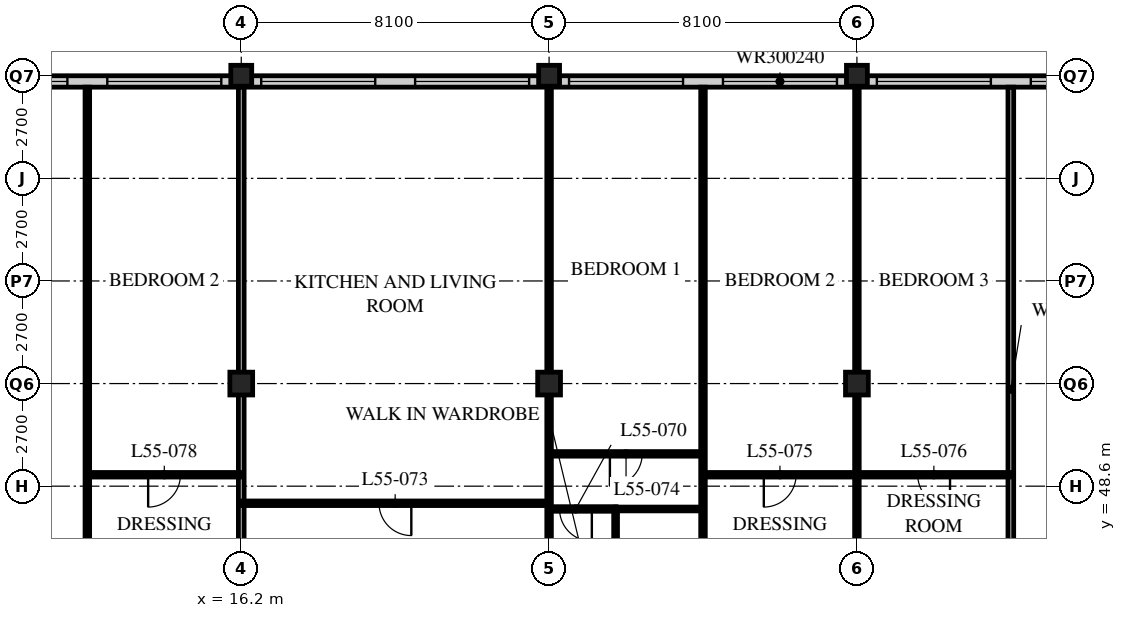
"""IFC4 building model, lengths in metres.
Left out: names, types, materials, properties, quantities, classifications, styles, units other than length and angle.
Written with IfcOpenShell. Run it as: python <this file> out.ifc"""

import sys

from ifc_helpers import new_model, si_unit, direction, frame, frame_2d, origin, origin_2d, place, context, subcontext, project, spatial, rectangle, hollow_rectangle, extrude, element, fill, save


model = new_model("IFC4")
c1 = context("Model", 3, precision=1e-05, world=origin(), true_north=direction((0.0, 1.0)))
c2 = subcontext(c1, "Body", "Model", "MODEL_VIEW")
j1 = project(units=[si_unit("LENGTHUNIT", "METRE"), si_unit("PLANEANGLEUNIT", "RADIAN")], contexts=[c1])
p1 = place(None, origin())
s1 = spatial("IfcSite", under=j1, at=p1, CompositionType="ELEMENT")
p2 = place(p1, origin())
s2 = spatial("IfcBuilding", under=s1, at=p2, CompositionType="ELEMENT")
p3 = place(p2, frame((0.0, 0.0, 213.6)))
s3 = spatial("IfcBuildingStorey", under=s2, at=p3, CompositionType="ELEMENT", Elevation=213.6)
p4 = place(p3, frame((16.2, 51.3, 0.0), z_axis=(0.0, 0.0, 1.0), x_axis=(1.0, 0.0, 0.0)))
e1 = element("IfcColumn", 1, at=p4, inside=s3, PredefinedType="COLUMN", context=c2, shape_type="SweptSolid", body=[
    extrude(hollow_rectangle(XDim=0.6, YDim=0.6, WallThickness=0.05, at=origin_2d()), origin(), (0.0, 0.0, 1.0), 3.6),
])
p5 = place(p3, frame((16.2, 59.4, 0.0), z_axis=(0.0, 0.0, 1.0), x_axis=(1.0, 0.0, 0.0)))
e2 = element("IfcColumn", 2, at=p5, inside=s3, PredefinedType="COLUMN", context=c2, shape_type="SweptSolid", body=[
    extrude(hollow_rectangle(XDim=0.55, YDim=0.55, WallThickness=0.045, at=origin_2d()), origin(), (0.0, 0.0, 1.0), 3.6),
])
p6 = place(p3, frame((24.3, 51.3, 0.0), z_axis=(0.0, 0.0, 1.0), x_axis=(1.0, 0.0, 0.0)))
e3 = element("IfcColumn", 3, at=p6, inside=s3, PredefinedType="COLUMN", context=c2, shape_type="SweptSolid", body=[
    extrude(hollow_rectangle(XDim=0.6, YDim=0.6, WallThickness=0.05, at=origin_2d()), origin(), (0.0, 0.0, 1.0), 3.6),
])
p7 = place(p3, frame((24.3, 59.4, 0.0), z_axis=(0.0, 0.0, 1.0), x_axis=(1.0, 0.0, 0.0)))
e4 = element("IfcColumn", 4, at=p7, inside=s3, PredefinedType="COLUMN", context=c2, shape_type="SweptSolid", body=[
    extrude(hollow_rectangle(XDim=0.55, YDim=0.55, WallThickness=0.045, at=origin_2d()), origin(), (0.0, 0.0, 1.0), 3.6),
])
p8 = place(p3, frame((32.4, 51.3, 0.0), z_axis=(0.0, 0.0, 1.0), x_axis=(1.0, 0.0, 0.0)))
e5 = element("IfcColumn", 5, at=p8, inside=s3, PredefinedType="COLUMN", context=c2, shape_type="SweptSolid", body=[
    extrude(hollow_rectangle(XDim=0.6, YDim=0.6, WallThickness=0.05, at=origin_2d()), origin(), (0.0, 0.0, 1.0), 3.6),
])
p9 = place(p3, frame((32.4, 59.4, 0.0), z_axis=(0.0, 0.0, 1.0), x_axis=(1.0, 0.0, 0.0)))
e6 = element("IfcColumn", 6, at=p9, inside=s3, PredefinedType="COLUMN", context=c2, shape_type="SweptSolid", body=[
    extrude(hollow_rectangle(XDim=0.55, YDim=0.55, WallThickness=0.045, at=origin_2d()), origin(), (0.0, 0.0, 1.0), 3.6),
])
p10 = place(p3, frame((48.3, 59.25, 0.0), z_axis=(0.0, 0.0, 1.0), x_axis=(-1.0, 0.0, 0.0)))
e7 = element("IfcWall", 7, at=p10, inside=s3, PredefinedType="SOLIDWALL", context=c2, shape_type="SweptSolid", body=[
    extrude(rectangle(XDim=40.2, YDim=0.3, at=frame_2d((20.1, 0.0))), origin(), (0.0, 0.0, 1.0), 3.39),
])
p11 = place(p10, frame((0.225, 0.0, 0.6)))
e8 = element("IfcOpeningElement", 8, at=p11, cuts=e7, PredefinedType="OPENING", context=c2, shape_type="SweptSolid", body=[
    extrude(rectangle(XDim=3.0, YDim=2.4, at=frame_2d((1.5, 1.2))), frame((0.0, 0.16, 0.0), z_axis=(0.0, -1.0, 0.0), x_axis=(1.0, 0.0, 0.0)), (0.0, 0.0, 1.0), 0.32),
])
p12 = place(p10, frame((4.275, 0.0, 0.6)))
e9 = element("IfcOpeningElement", 9, at=p12, cuts=e7, PredefinedType="OPENING", context=c2, shape_type="SweptSolid", body=[
    extrude(rectangle(XDim=3.0, YDim=2.4, at=frame_2d((1.5, 1.2))), frame((0.0, 0.16, 0.0), z_axis=(0.0, -1.0, 0.0), x_axis=(1.0, 0.0, 0.0)), (0.0, 0.0, 1.0), 0.32),
])
p13 = place(p10, frame((8.325, 0.0, 0.6)))
e10 = element("IfcOpeningElement", 10, at=p13, cuts=e7, PredefinedType="OPENING", context=c2, shape_type="SweptSolid", body=[
    extrude(rectangle(XDim=3.0, YDim=2.4, at=frame_2d((1.5, 1.2))), frame((0.0, 0.16, 0.0), z_axis=(0.0, -1.0, 0.0), x_axis=(1.0, 0.0, 0.0)), (0.0, 0.0, 1.0), 0.32),
])
p14 = place(p10, frame((12.375, 0.0, 0.6)))
e11 = element("IfcOpeningElement", 11, at=p14, cuts=e7, PredefinedType="OPENING", context=c2, shape_type="SweptSolid", body=[
    extrude(rectangle(XDim=3.0, YDim=2.4, at=frame_2d((1.5, 1.2))), frame((0.0, 0.16, 0.0), z_axis=(0.0, -1.0, 0.0), x_axis=(1.0, 0.0, 0.0)), (0.0, 0.0, 1.0), 0.32),
])
p15 = place(p10, frame((16.425, 0.0, 0.6)))
e12 = element("IfcOpeningElement", 12, at=p15, cuts=e7, PredefinedType="OPENING", context=c2, shape_type="SweptSolid", body=[
    extrude(rectangle(XDim=3.0, YDim=2.4, at=frame_2d((1.5, 1.2))), frame((0.0, 0.16, 0.0), z_axis=(0.0, -1.0, 0.0), x_axis=(1.0, 0.0, 0.0)), (0.0, 0.0, 1.0), 0.32),
])
p16 = place(p10, frame((20.475, 0.0, 0.6)))
e13 = element("IfcOpeningElement", 13, at=p16, cuts=e7, PredefinedType="OPENING", context=c2, shape_type="SweptSolid", body=[
    extrude(rectangle(XDim=3.0, YDim=2.4, at=frame_2d((1.5, 1.2))), frame((0.0, 0.16, 0.0), z_axis=(0.0, -1.0, 0.0), x_axis=(1.0, 0.0, 0.0)), (0.0, 0.0, 1.0), 0.32),
])
p17 = place(p10, frame((24.525, 0.0, 0.6)))
e14 = element("IfcOpeningElement", 14, at=p17, cuts=e7, PredefinedType="OPENING", context=c2, shape_type="SweptSolid", body=[
    extrude(rectangle(XDim=3.0, YDim=2.4, at=frame_2d((1.5, 1.2))), frame((0.0, 0.16, 0.0), z_axis=(0.0, -1.0, 0.0), x_axis=(1.0, 0.0, 0.0)), (0.0, 0.0, 1.0), 0.32),
])
p18 = place(p10, frame((28.575, 0.0, 0.6)))
e15 = element("IfcOpeningElement", 15, at=p18, cuts=e7, PredefinedType="OPENING", context=c2, shape_type="SweptSolid", body=[
    extrude(rectangle(XDim=3.0, YDim=2.4, at=frame_2d((1.5, 1.2))), frame((0.0, 0.16, 0.0), z_axis=(0.0, -1.0, 0.0), x_axis=(1.0, 0.0, 0.0)), (0.0, 0.0, 1.0), 0.32),
])
p19 = place(p10, frame((32.625, 0.0, 0.6)))
e16 = element("IfcOpeningElement", 16, at=p19, cuts=e7, PredefinedType="OPENING", context=c2, shape_type="SweptSolid", body=[
    extrude(rectangle(XDim=3.0, YDim=2.4, at=frame_2d((1.5, 1.2))), frame((0.0, 0.16, 0.0), z_axis=(0.0, -1.0, 0.0), x_axis=(1.0, 0.0, 0.0)), (0.0, 0.0, 1.0), 0.32),
])
p20 = place(p10, frame((36.675, 0.0, 0.6)))
e17 = element("IfcOpeningElement", 17, at=p20, cuts=e7, PredefinedType="OPENING", context=c2, shape_type="SweptSolid", body=[
    extrude(rectangle(XDim=3.0, YDim=2.4, at=frame_2d((1.5, 1.2))), frame((0.0, 0.16, 0.0), z_axis=(0.0, -1.0, 0.0), x_axis=(1.0, 0.0, 0.0)), (0.0, 0.0, 1.0), 0.32),
])
p21 = place(p3, frame((26.05, 45.6, 0.0), z_axis=(0.0, 0.0, 1.0), x_axis=(0.0, 1.0, 0.0)))
e18 = element("IfcWall", 18, at=p21, inside=s3, PredefinedType="PARTITIONING", context=c2, shape_type="SweptSolid", body=[
    extrude(rectangle(XDim=2.4, YDim=0.1, at=frame_2d((1.2, 0.0))), origin(), (0.0, 0.0, 1.0), 3.39),
])
p22 = place(p21, frame((0.8, 0.0, 0.0)))
e19 = element("IfcOpeningElement", 19, at=p22, cuts=e18, PredefinedType="OPENING", context=c2, shape_type="SweptSolid", body=[
    extrude(rectangle(XDim=0.8, YDim=2.1, at=frame_2d((0.4, 1.05))), frame((0.0, 0.06, 0.0), z_axis=(0.0, -1.0, 0.0), x_axis=(1.0, 0.0, 0.0)), (0.0, 0.0, 1.0), 0.12),
])
p23 = place(p3, frame((26.05, 48.0, 0.0), z_axis=(0.0, 0.0, 1.0), x_axis=(1.0, 0.0, 0.0)))
e20 = element("IfcWall", 20, at=p23, inside=s3, PredefinedType="PARTITIONING", context=c2, shape_type="SweptSolid", body=[
    extrude(rectangle(XDim=2.3, YDim=0.1, at=frame_2d((1.15, 0.0))), origin(), (0.0, 0.0, 1.0), 3.39),
])
p24 = place(p3, frame((24.3, 45.6, 0.0), z_axis=(0.0, 0.0, 1.0), x_axis=(0.0, 1.0, 0.0)))
e21 = element("IfcWall", 21, at=p24, inside=s3, PredefinedType="PARTITIONING", context=c2, shape_type="SweptSolid", body=[
    extrude(rectangle(XDim=13.5, YDim=0.12, at=frame_2d((6.75, 0.0))), origin(), (0.0, 0.0, 1.0), 2.778),
])
p25 = place(p3, frame((28.35, 45.6, 0.0), z_axis=(0.0, 0.0, 1.0), x_axis=(0.0, 1.0, 0.0)))
e22 = element("IfcWall", 22, at=p25, inside=s3, PredefinedType="PARTITIONING", context=c2, shape_type="SweptSolid", body=[
    extrude(rectangle(XDim=13.5, YDim=0.12, at=frame_2d((6.75, 0.0))), origin(), (0.0, 0.0, 1.0), 3.39),
])
p26 = place(p3, frame((32.4, 45.6, 0.0), z_axis=(0.0, 0.0, 1.0), x_axis=(0.0, 1.0, 0.0)))
e23 = element("IfcWall", 23, at=p26, inside=s3, PredefinedType="PARTITIONING", context=c2, shape_type="SweptSolid", body=[
    extrude(rectangle(XDim=13.5, YDim=0.12, at=frame_2d((6.75, 0.0))), origin(), (0.0, 0.0, 1.0), 2.778),
])
p27 = place(p3, frame((36.45, 43.2, 0.0), z_axis=(0.0, 0.0, 1.0), x_axis=(0.0, 1.0, 0.0)))
e24 = element("IfcWall", 24, at=p27, inside=s3, PredefinedType="PARTITIONING", context=c2, shape_type="SweptSolid", body=[
    extrude(rectangle(XDim=15.9, YDim=0.15, at=frame_2d((7.95, 0.0))), origin(), (0.0, 0.0, 1.0), 3.39),
])
p28 = place(p3, frame((12.15, 45.6, 0.0), z_axis=(0.0, 0.0, 1.0), x_axis=(0.0, 1.0, 0.0)))
e25 = element("IfcWall", 25, at=p28, inside=s3, PredefinedType="PARTITIONING", context=c2, shape_type="SweptSolid", body=[
    extrude(rectangle(XDim=13.5, YDim=0.12, at=frame_2d((6.75, 0.0))), origin(), (0.0, 0.0, 1.0), 3.39),
])
p29 = place(p3, frame((16.2, 43.2, 0.0), z_axis=(0.0, 0.0, 1.0), x_axis=(0.0, 1.0, 0.0)))
e26 = element("IfcWall", 26, at=p29, inside=s3, PredefinedType="PARTITIONING", context=c2, shape_type="SweptSolid", body=[
    extrude(rectangle(XDim=15.9, YDim=0.15, at=frame_2d((7.95, 0.0))), origin(), (0.0, 0.0, 1.0), 2.778),
])
p30 = place(p3, frame((24.3, 48.0, 0.0), z_axis=(0.0, 0.0, 1.0), x_axis=(1.0, 0.0, 0.0)))
e27 = element("IfcWall", 27, at=p30, inside=s3, PredefinedType="PARTITIONING", context=c2, shape_type="SweptSolid", body=[
    extrude(rectangle(XDim=1.76, YDim=0.12, at=frame_2d((0.88, 0.0))), origin(), (0.0, 0.0, 1.0), 3.39),
])
p31 = place(p30, frame((0.275, 0.0, 0.0)))
e28 = element("IfcOpeningElement", 28, at=p31, cuts=e27, PredefinedType="OPENING", context=c2, shape_type="SweptSolid", body=[
    extrude(rectangle(XDim=0.85, YDim=2.1, at=frame_2d((0.425, 1.05))), frame((0.0, 0.07, 0.0), z_axis=(0.0, -1.0, 0.0), x_axis=(1.0, 0.0, 0.0)), (0.0, 0.0, 1.0), 0.14),
])
p32 = place(p3, frame((16.2, 48.15, 0.0), z_axis=(0.0, 0.0, 1.0), x_axis=(1.0, 0.0, 0.0)))
e29 = element("IfcWall", 29, at=p32, inside=s3, PredefinedType="PARTITIONING", context=c2, shape_type="SweptSolid", body=[
    extrude(rectangle(XDim=8.1, YDim=0.12, at=frame_2d((4.05, 0.0))), origin(), (0.0, 0.0, 1.0), 3.39),
])
p33 = place(p32, frame((3.625, 0.0, 0.0)))
e30 = element("IfcOpeningElement", 30, at=p33, cuts=e29, PredefinedType="OPENING", context=c2, shape_type="SweptSolid", body=[
    extrude(rectangle(XDim=0.85, YDim=2.1, at=frame_2d((0.425, 1.05))), frame((0.0, 0.07, 0.0), z_axis=(0.0, -1.0, 0.0), x_axis=(1.0, 0.0, 0.0)), (0.0, 0.0, 1.0), 0.14),
])
p34 = place(p3, frame((24.3, 49.45, 0.0), z_axis=(0.0, 0.0, 1.0), x_axis=(1.0, 0.0, 0.0)))
e31 = element("IfcWall", 31, at=p34, inside=s3, PredefinedType="PARTITIONING", context=c2, shape_type="SweptSolid", body=[
    extrude(rectangle(XDim=4.05, YDim=0.12, at=frame_2d((2.025, 0.0))), origin(), (0.0, 0.0, 1.0), 3.39),
])
p35 = place(p34, frame((1.6, 0.0, 0.0)))
e32 = element("IfcOpeningElement", 32, at=p35, cuts=e31, PredefinedType="OPENING", context=c2, shape_type="SweptSolid", body=[
    extrude(rectangle(XDim=0.85, YDim=2.1, at=frame_2d((0.425, 1.05))), frame((0.0, 0.07, 0.0), z_axis=(0.0, -1.0, 0.0), x_axis=(1.0, 0.0, 0.0)), (0.0, 0.0, 1.0), 0.14),
])
p36 = place(p3, frame((28.35, 48.9, 0.0), z_axis=(0.0, 0.0, 1.0), x_axis=(1.0, 0.0, 0.0)))
e33 = element("IfcWall", 33, at=p36, inside=s3, PredefinedType="PARTITIONING", context=c2, shape_type="SweptSolid", body=[
    extrude(rectangle(XDim=8.1, YDim=0.12, at=frame_2d((4.05, 0.0))), origin(), (0.0, 0.0, 1.0), 3.39),
])
p37 = place(p36, frame((1.6, 0.0, 0.0)))
e34 = element("IfcOpeningElement", 34, at=p37, cuts=e33, PredefinedType="OPENING", context=c2, shape_type="SweptSolid", body=[
    extrude(rectangle(XDim=0.85, YDim=2.1, at=frame_2d((0.425, 1.05))), frame((0.0, 0.07, 0.0), z_axis=(0.0, -1.0, 0.0), x_axis=(1.0, 0.0, 0.0)), (0.0, 0.0, 1.0), 0.14),
])
p38 = place(p36, frame((5.65, 0.0, 0.0)))
e35 = element("IfcOpeningElement", 35, at=p38, cuts=e33, PredefinedType="OPENING", context=c2, shape_type="SweptSolid", body=[
    extrude(rectangle(XDim=0.85, YDim=2.1, at=frame_2d((0.425, 1.05))), frame((0.0, 0.07, 0.0), z_axis=(0.0, -1.0, 0.0), x_axis=(1.0, 0.0, 0.0)), (0.0, 0.0, 1.0), 0.14),
])
p39 = place(p3, frame((12.15, 48.9, 0.0), z_axis=(0.0, 0.0, 1.0), x_axis=(1.0, 0.0, 0.0)))
e36 = element("IfcWall", 36, at=p39, inside=s3, PredefinedType="PARTITIONING", context=c2, shape_type="SweptSolid", body=[
    extrude(rectangle(XDim=4.05, YDim=0.12, at=frame_2d((2.025, 0.0))), origin(), (0.0, 0.0, 1.0), 3.39),
])
p40 = place(p39, frame((1.6, 0.0, 0.0)))
e37 = element("IfcOpeningElement", 37, at=p40, cuts=e36, PredefinedType="OPENING", context=c2, shape_type="SweptSolid", body=[
    extrude(rectangle(XDim=0.85, YDim=2.1, at=frame_2d((0.425, 1.05))), frame((0.0, 0.07, 0.0), z_axis=(0.0, -1.0, 0.0), x_axis=(1.0, 0.0, 0.0)), (0.0, 0.0, 1.0), 0.14),
])
p41 = place(p13, origin())
e38 = element("IfcWindow", 38, at=p41, inside=s3, PartitioningType="SINGLE_PANEL", PredefinedType="WINDOW", context=c2, shape_type="SweptSolid", body=[
    extrude(rectangle(XDim=3.0, YDim=2.4, at=frame_2d((1.5, 1.2))), frame((0.0, 0.03, 0.0), z_axis=(0.0, -1.0, 0.0), x_axis=(1.0, 0.0, 0.0)), (0.0, 0.0, 1.0), 0.06),
])
fill(e10, e38)
p42 = place(p14, origin())
e39 = element("IfcWindow", 39, at=p42, inside=s3, PartitioningType="SINGLE_PANEL", PredefinedType="WINDOW", context=c2, shape_type="SweptSolid", body=[
    extrude(rectangle(XDim=3.0, YDim=2.4, at=frame_2d((1.5, 1.2))), frame((0.0, 0.03, 0.0), z_axis=(0.0, -1.0, 0.0), x_axis=(1.0, 0.0, 0.0)), (0.0, 0.0, 1.0), 0.06),
])
fill(e11, e39)
p43 = place(p15, origin())
e40 = element("IfcWindow", 40, at=p43, inside=s3, PartitioningType="SINGLE_PANEL", PredefinedType="WINDOW", context=c2, shape_type="SweptSolid", body=[
    extrude(rectangle(XDim=3.0, YDim=2.4, at=frame_2d((1.5, 1.2))), frame((0.0, 0.03, 0.0), z_axis=(0.0, -1.0, 0.0), x_axis=(1.0, 0.0, 0.0)), (0.0, 0.0, 1.0), 0.06),
])
fill(e12, e40)
p44 = place(p16, origin())
e41 = element("IfcWindow", 41, at=p44, inside=s3, PartitioningType="SINGLE_PANEL", PredefinedType="WINDOW", context=c2, shape_type="SweptSolid", body=[
    extrude(rectangle(XDim=3.0, YDim=2.4, at=frame_2d((1.5, 1.2))), frame((0.0, 0.03, 0.0), z_axis=(0.0, -1.0, 0.0), x_axis=(1.0, 0.0, 0.0)), (0.0, 0.0, 1.0), 0.06),
])
fill(e13, e41)
p45 = place(p17, origin())
e42 = element("IfcWindow", 42, at=p45, inside=s3, PartitioningType="SINGLE_PANEL", PredefinedType="WINDOW", context=c2, shape_type="SweptSolid", body=[
    extrude(rectangle(XDim=3.0, YDim=2.4, at=frame_2d((1.5, 1.2))), frame((0.0, 0.03, 0.0), z_axis=(0.0, -1.0, 0.0), x_axis=(1.0, 0.0, 0.0)), (0.0, 0.0, 1.0), 0.06),
])
fill(e14, e42)
p46 = place(p18, origin())
e43 = element("IfcWindow", 43, at=p46, inside=s3, PartitioningType="SINGLE_PANEL", PredefinedType="WINDOW", context=c2, shape_type="SweptSolid", body=[
    extrude(rectangle(XDim=3.0, YDim=2.4, at=frame_2d((1.5, 1.2))), frame((0.0, 0.03, 0.0), z_axis=(0.0, -1.0, 0.0), x_axis=(1.0, 0.0, 0.0)), (0.0, 0.0, 1.0), 0.06),
])
fill(e15, e43)
p47 = place(p19, origin())
e44 = element("IfcWindow", 44, at=p47, inside=s3, PartitioningType="SINGLE_PANEL", PredefinedType="WINDOW", context=c2, shape_type="SweptSolid", body=[
    extrude(rectangle(XDim=3.0, YDim=2.4, at=frame_2d((1.5, 1.2))), frame((0.0, 0.03, 0.0), z_axis=(0.0, -1.0, 0.0), x_axis=(1.0, 0.0, 0.0)), (0.0, 0.0, 1.0), 0.06),
])
fill(e16, e44)
p48 = place(p20, origin())
e45 = element("IfcWindow", 45, at=p48, inside=s3, PartitioningType="SINGLE_PANEL", PredefinedType="WINDOW", context=c2, shape_type="SweptSolid", body=[
    extrude(rectangle(XDim=3.0, YDim=2.4, at=frame_2d((1.5, 1.2))), frame((0.0, 0.03, 0.0), z_axis=(0.0, -1.0, 0.0), x_axis=(1.0, 0.0, 0.0)), (0.0, 0.0, 1.0), 0.06),
])
fill(e17, e45)
p49 = place(p31, origin())
e46 = element("IfcDoor", 46, at=p49, inside=s3, OperationType="SINGLE_SWING_LEFT", PredefinedType="DOOR", context=c2, shape_type="SweptSolid", body=[
    extrude(rectangle(XDim=0.85, YDim=2.1, at=frame_2d((0.425, 1.05))), frame((0.0, 0.025, 0.0), z_axis=(0.0, -1.0, 0.0), x_axis=(1.0, 0.0, 0.0)), (0.0, 0.0, 1.0), 0.05),
])
fill(e28, e46)
p50 = place(p33, origin())
e47 = element("IfcDoor", 47, at=p50, inside=s3, OperationType="SINGLE_SWING_LEFT", PredefinedType="DOOR", context=c2, shape_type="SweptSolid", body=[
    extrude(rectangle(XDim=0.85, YDim=2.1, at=frame_2d((0.425, 1.05))), frame((0.0, 0.025, 0.0), z_axis=(0.0, -1.0, 0.0), x_axis=(1.0, 0.0, 0.0)), (0.0, 0.0, 1.0), 0.05),
])
fill(e30, e47)
p51 = place(p35, origin())
e48 = element("IfcDoor", 48, at=p51, inside=s3, OperationType="SINGLE_SWING_RIGHT", PredefinedType="DOOR", context=c2, shape_type="SweptSolid", body=[
    extrude(rectangle(XDim=0.85, YDim=2.1, at=frame_2d((0.425, 1.05))), frame((0.0, 0.025, 0.0), z_axis=(0.0, -1.0, 0.0), x_axis=(1.0, 0.0, 0.0)), (0.0, 0.0, 1.0), 0.05),
])
fill(e32, e48)
p52 = place(p37, origin())
e49 = element("IfcDoor", 49, at=p52, inside=s3, OperationType="SINGLE_SWING_RIGHT", PredefinedType="DOOR", context=c2, shape_type="SweptSolid", body=[
    extrude(rectangle(XDim=0.85, YDim=2.1, at=frame_2d((0.425, 1.05))), frame((0.0, 0.025, 0.0), z_axis=(0.0, -1.0, 0.0), x_axis=(1.0, 0.0, 0.0)), (0.0, 0.0, 1.0), 0.05),
])
fill(e34, e49)
p53 = place(p38, origin())
e50 = element("IfcDoor", 50, at=p53, inside=s3, OperationType="SINGLE_SWING_LEFT", PredefinedType="DOOR", context=c2, shape_type="SweptSolid", body=[
    extrude(rectangle(XDim=0.85, YDim=2.1, at=frame_2d((0.425, 1.05))), frame((0.0, 0.025, 0.0), z_axis=(0.0, -1.0, 0.0), x_axis=(1.0, 0.0, 0.0)), (0.0, 0.0, 1.0), 0.05),
])
fill(e35, e50)
p54 = place(p40, origin())
e51 = element("IfcDoor", 51, at=p54, inside=s3, OperationType="SINGLE_SWING_RIGHT", PredefinedType="DOOR", context=c2, shape_type="SweptSolid", body=[
    extrude(rectangle(XDim=0.85, YDim=2.1, at=frame_2d((0.425, 1.05))), frame((0.0, 0.025, 0.0), z_axis=(0.0, -1.0, 0.0), x_axis=(1.0, 0.0, 0.0)), (0.0, 0.0, 1.0), 0.05),
])
fill(e37, e51)
save(model, sys.argv[1])
